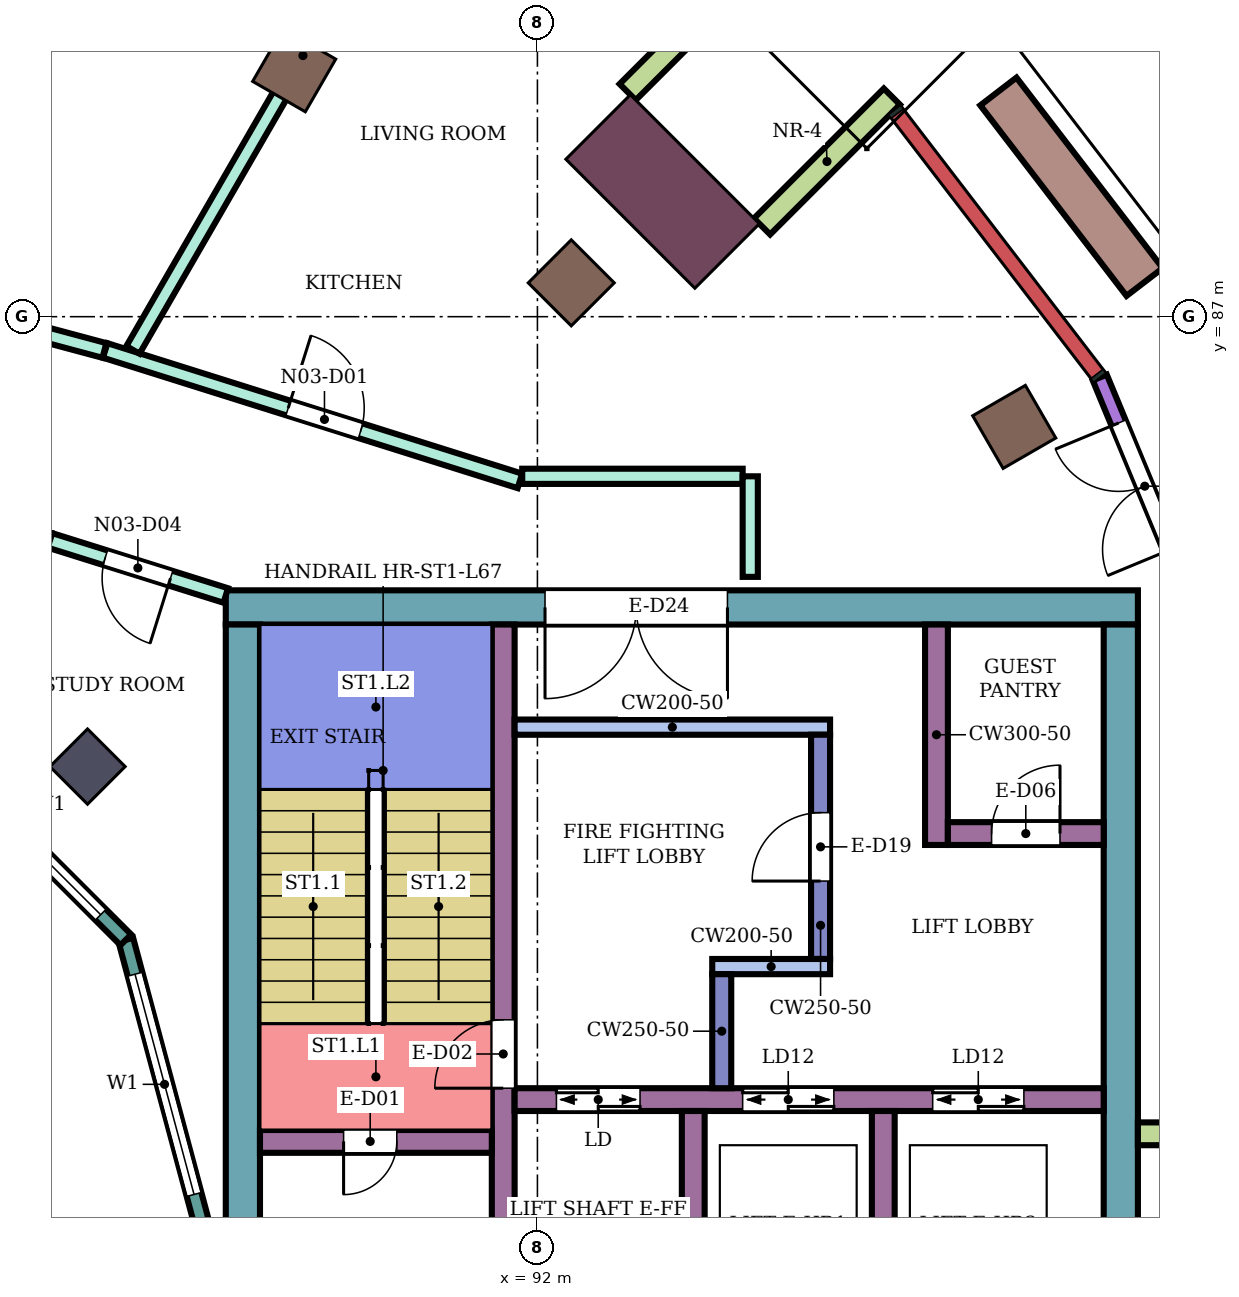
"""IFC4 building model, lengths in metres.
Left out: names, types, materials, properties, quantities, classifications, styles, units other than length and angle.
Written with IfcOpenShell. Run it as: python <this file> out.ifc"""

import sys

from ifc_helpers import new_model, si_unit, direction, frame, frame_2d, origin, origin_2d, place, context, subcontext, project, spatial, rectangle, extrude, element, fill, save


model = new_model("IFC4")
c1 = context("Model", 3, precision=1e-05, world=origin(), true_north=direction((0.0, 1.0)))
c2 = subcontext(c1, "Body", "Model", "MODEL_VIEW")
j1 = project(units=[si_unit("LENGTHUNIT", "METRE"), si_unit("PLANEANGLEUNIT", "RADIAN")], contexts=[c1])
p1 = place(None, origin())
s1 = spatial("IfcSite", under=j1, at=p1, CompositionType="ELEMENT")
p2 = place(p1, origin())
s2 = spatial("IfcBuilding", under=s1, at=p2, CompositionType="ELEMENT")
p3 = place(p2, frame((0.0, 0.0, 292.5)))
s3 = spatial("IfcBuildingStorey", under=s2, at=p3, CompositionType="ELEMENT", Elevation=292.5)
for number, where, z_axis, x_axis in (
    (1, (98.273, 85.55, 0.0), (0.0, 0.0, 1.0), (0.866, 0.5, 0.0)),
    (2, (92.445, 87.445, 0.0), (0.0, 0.0, 1.0), (0.707, 0.707, 0.0)),
    (3, (88.8, 90.242, 0.0), (0.0, 0.0, 1.0), (0.5, 0.866, 0.0)),
):
    element("IfcColumn", number, at=place(p3, frame(where, z_axis=z_axis, x_axis=x_axis)), inside=s3, PredefinedType="COLUMN", context=c2, shape_type="SweptSolid", body=[
        extrude(rectangle(XDim=0.8, YDim=0.8, at=origin_2d()), origin(), (0.0, 0.0, 1.0), 4.2),
    ])
p4 = place(p3, frame((86.081, 81.081, 0.0), z_axis=(0.0, 0.0, 1.0), x_axis=(0.707106781187, 0.707106781187, 0.0)))
e4 = element("IfcColumn", 4, at=p4, inside=s3, PredefinedType="COLUMN", context=c2, shape_type="SweptSolid", body=[
    extrude(rectangle(XDim=0.7, YDim=0.7, at=origin_2d()), origin(), (0.0, 0.0, 1.0), 4.2),
])
p5 = place(p3, frame((93.647, 88.647, 0.0), z_axis=(0.0, 0.0, 1.0), x_axis=(0.707106781187, 0.707106781187, 0.0)))
e5 = element("IfcColumn", 5, at=p5, inside=s3, PredefinedType="COLUMN", context=c2, shape_type="SweptSolid", body=[
    extrude(rectangle(XDim=1.2, YDim=2.4, at=origin_2d()), origin(), (0.0, 0.0, 1.0), 4.2),
])
p6 = place(p3, frame((87.9, 83.175, 0.0), z_axis=(0.0, 0.0, 1.0), x_axis=(1.0, 0.0, 0.0)))
e6 = element("IfcWall", 6, at=p6, inside=s3, PredefinedType="SHEAR", context=c2, shape_type="SweptSolid", body=[
    extrude(rectangle(XDim=12.0, YDim=0.45, at=frame_2d((6.0, 0.0))), origin(), (0.0, 0.0, 1.0), 3.88),
])
p7 = place(p6, frame((4.2, 0.0, 0.0)))
e7 = element("IfcOpeningElement", 7, at=p7, cuts=e6, PredefinedType="OPENING", context=c2, shape_type="SweptSolid", body=[
    extrude(rectangle(XDim=2.4, YDim=2.4, at=frame_2d((1.2, 1.2))), frame((0.0, 0.235, 0.0), z_axis=(0.0, -1.0, 0.0), x_axis=(1.0, 0.0, 0.0)), (0.0, 0.0, 1.0), 0.47),
])
p8 = place(p3, frame((88.125, 75.0, 0.0), z_axis=(0.0, 0.0, 1.0), x_axis=(0.0, 1.0, 0.0)))
e8 = element("IfcWall", 8, at=p8, inside=s3, PredefinedType="SHEAR", context=c2, shape_type="SweptSolid", body=[
    extrude(rectangle(XDim=7.95, YDim=0.45, at=frame_2d((3.975, 0.0))), origin(), (0.0, 0.0, 1.0), 3.88),
])
p9 = place(p3, frame((99.675, 73.6, 0.0), z_axis=(0.0, 0.0, 1.0), x_axis=(0.0, 1.0, 0.0)))
e9 = element("IfcWall", 9, at=p9, inside=s3, PredefinedType="SHEAR", context=c2, shape_type="SweptSolid", body=[
    extrude(rectangle(XDim=9.35, YDim=0.45, at=frame_2d((4.675, 0.0))), origin(), (0.0, 0.0, 1.0), 3.88),
])
p10 = place(p3, frame((91.55, 75.0, 0.0), z_axis=(0.0, 0.0, 1.0), x_axis=(0.0, 1.0, 0.0)))
e10 = element("IfcWall", 10, at=p10, inside=s3, PredefinedType="SHEAR", context=c2, shape_type="SweptSolid", body=[
    extrude(rectangle(XDim=7.95, YDim=0.3, at=frame_2d((3.975, 0.0))), origin(), (0.0, 0.0, 1.0), 3.88),
])
p11 = place(p10, frame((1.85, 0.0, 0.0)))
e11 = element("IfcOpeningElement", 11, at=p11, cuts=e10, PredefinedType="OPENING", context=c2, shape_type="SweptSolid", body=[
    extrude(rectangle(XDim=0.9, YDim=2.1, at=frame_2d((0.45, 1.05))), frame((0.0, 0.16, 0.0), z_axis=(0.0, -1.0, 0.0), x_axis=(1.0, 0.0, 0.0)), (0.0, 0.0, 1.0), 0.32),
])
p12 = place(p3, frame((88.35, 76.15, 0.0), z_axis=(0.0, 0.0, 1.0), x_axis=(1.0, 0.0, 0.0)))
e12 = element("IfcWall", 12, at=p12, inside=s3, PredefinedType="SHEAR", context=c2, shape_type="SweptSolid", body=[
    extrude(rectangle(XDim=3.05, YDim=0.3, at=frame_2d((1.525, 0.0))), origin(), (0.0, 0.0, 1.0), 3.88),
])
p13 = place(p12, frame((1.1, 0.0, 0.0)))
e13 = element("IfcOpeningElement", 13, at=p13, cuts=e12, PredefinedType="OPENING", context=c2, shape_type="SweptSolid", body=[
    extrude(rectangle(XDim=0.7, YDim=2.0, at=frame_2d((0.35, 1.0))), frame((0.0, 0.16, 0.0), z_axis=(0.0, -1.0, 0.0), x_axis=(1.0, 0.0, 0.0)), (0.0, 0.0, 1.0), 0.32),
])
p14 = place(p3, frame((91.7, 76.7, 0.0), z_axis=(0.0, 0.0, 1.0), x_axis=(1.0, 0.0, 0.0)))
e14 = element("IfcWall", 14, at=p14, inside=s3, PredefinedType="SHEAR", context=c2, shape_type="SweptSolid", body=[
    extrude(rectangle(XDim=7.75, YDim=0.3, at=frame_2d((3.875, 0.0))), origin(), (0.0, 0.0, 1.0), 3.88),
])
p15 = place(p14, frame((0.55, 0.0, 0.0)))
e15 = element("IfcOpeningElement", 15, at=p15, cuts=e14, PredefinedType="OPENING", context=c2, shape_type="SweptSolid", body=[
    extrude(rectangle(XDim=1.1, YDim=2.1, at=frame_2d((0.55, 1.05))), frame((0.0, 0.16, 0.0), z_axis=(0.0, -1.0, 0.0), x_axis=(1.0, 0.0, 0.0)), (0.0, 0.0, 1.0), 0.32),
])
p16 = place(p14, frame((3.0, 0.0, 0.0)))
e16 = element("IfcOpeningElement", 16, at=p16, cuts=e14, PredefinedType="OPENING", context=c2, shape_type="SweptSolid", body=[
    extrude(rectangle(XDim=1.2, YDim=2.1, at=frame_2d((0.6, 1.05))), frame((0.0, 0.16, 0.0), z_axis=(0.0, -1.0, 0.0), x_axis=(1.0, 0.0, 0.0)), (0.0, 0.0, 1.0), 0.32),
])
p17 = place(p14, frame((5.5, 0.0, 0.0)))
e17 = element("IfcOpeningElement", 17, at=p17, cuts=e14, PredefinedType="OPENING", context=c2, shape_type="SweptSolid", body=[
    extrude(rectangle(XDim=1.2, YDim=2.1, at=frame_2d((0.6, 1.05))), frame((0.0, 0.16, 0.0), z_axis=(0.0, -1.0, 0.0), x_axis=(1.0, 0.0, 0.0)), (0.0, 0.0, 1.0), 0.32),
])
for number, where, z_axis, x_axis in (
    (18, (94.05, 74.0, 0.0), (0.0, 0.0, 1.0), (0.0, 1.0, 0.0)),
    (19, (96.55, 74.0, 0.0), (0.0, 0.0, 1.0), (0.0, 1.0, 0.0)),
):
    element("IfcWall", number, at=place(p3, frame(where, z_axis=z_axis, x_axis=x_axis)), inside=s3, PredefinedType="SHEAR", context=c2, shape_type="SweptSolid", body=[
        extrude(rectangle(XDim=2.55, YDim=0.3, at=frame_2d((1.275, 0.0))), origin(), (0.0, 0.0, 1.0), 3.88),
    ])
p18 = place(p3, frame((91.7, 81.6, 0.0), z_axis=(0.0, 0.0, 1.0), x_axis=(1.0, 0.0, 0.0)))
e20 = element("IfcWall", 20, at=p18, inside=s3, PredefinedType="SHEAR", context=c2, shape_type="SweptSolid", body=[
    extrude(rectangle(XDim=4.15, YDim=0.2, at=frame_2d((2.075, 0.0))), origin(), (0.0, 0.0, 1.0), 3.88),
])
p19 = place(p3, frame((95.725, 78.55, 0.0), z_axis=(0.0, 0.0, 1.0), x_axis=(0.0, 1.0, 0.0)))
e21 = element("IfcWall", 21, at=p19, inside=s3, PredefinedType="SHEAR", context=c2, shape_type="SweptSolid", body=[
    extrude(rectangle(XDim=2.95, YDim=0.25, at=frame_2d((1.475, 0.0))), origin(), (0.0, 0.0, 1.0), 3.88),
])
p20 = place(p19, frame((1.025, 0.0, 0.0)))
e22 = element("IfcOpeningElement", 22, at=p20, cuts=e21, PredefinedType="OPENING", context=c2, shape_type="SweptSolid", body=[
    extrude(rectangle(XDim=0.9, YDim=2.1, at=frame_2d((0.45, 1.05))), frame((0.0, 0.135, 0.0), z_axis=(0.0, -1.0, 0.0), x_axis=(1.0, 0.0, 0.0)), (0.0, 0.0, 1.0), 0.27),
])
p21 = place(p3, frame((94.3, 78.45, 0.0), z_axis=(0.0, 0.0, 1.0), x_axis=(1.0, 0.0, 0.0)))
e23 = element("IfcWall", 23, at=p21, inside=s3, PredefinedType="SHEAR", context=c2, shape_type="SweptSolid", body=[
    extrude(rectangle(XDim=1.55, YDim=0.2, at=frame_2d((0.775, 0.0))), origin(), (0.0, 0.0, 1.0), 3.88),
])
p22 = place(p3, frame((94.425, 76.85, 0.0), z_axis=(0.0, 0.0, 1.0), x_axis=(0.0, 1.0, 0.0)))
e24 = element("IfcWall", 24, at=p22, inside=s3, PredefinedType="SHEAR", context=c2, shape_type="SweptSolid", body=[
    extrude(rectangle(XDim=1.5, YDim=0.25, at=frame_2d((0.75, 0.0))), origin(), (0.0, 0.0, 1.0), 3.88),
])
p23 = place(p3, frame((97.25, 80.05, 0.0), z_axis=(0.0, 0.0, 1.0), x_axis=(0.0, 1.0, 0.0)))
e25 = element("IfcWall", 25, at=p23, inside=s3, PredefinedType="SHEAR", context=c2, shape_type="SweptSolid", body=[
    extrude(rectangle(XDim=2.9, YDim=0.3, at=frame_2d((1.45, 0.0))), origin(), (0.0, 0.0, 1.0), 3.88),
])
p24 = place(p3, frame((97.4, 80.2, 0.0), z_axis=(0.0, 0.0, 1.0), x_axis=(1.0, 0.0, 0.0)))
e26 = element("IfcWall", 26, at=p24, inside=s3, PredefinedType="SHEAR", context=c2, shape_type="SweptSolid", body=[
    extrude(rectangle(XDim=2.05, YDim=0.3, at=frame_2d((1.025, 0.0))), origin(), (0.0, 0.0, 1.0), 3.88),
])
p25 = place(p24, frame((0.575, 0.0, 0.0)))
e27 = element("IfcOpeningElement", 27, at=p25, cuts=e26, PredefinedType="OPENING", context=c2, shape_type="SweptSolid", body=[
    extrude(rectangle(XDim=0.9, YDim=2.1, at=frame_2d((0.45, 1.05))), frame((0.0, 0.16, 0.0), z_axis=(0.0, -1.0, 0.0), x_axis=(1.0, 0.0, 0.0)), (0.0, 0.0, 1.0), 0.32),
])
p26 = place(p3, frame((101.636, 80.797, 0.0), z_axis=(0.0, 0.0, 1.0), x_axis=(-0.382708254591, 0.923869250418, 0.0)))
e28 = element("IfcWall", 28, at=p26, inside=s3, PredefinedType="NOTDEFINED", context=c2, shape_type="SweptSolid", body=[
    extrude(rectangle(XDim=5.847, YDim=0.2, at=frame_2d((2.924, 0.0))), origin(), (0.0, 0.0, 1.0), 4.2),
])
p27 = place(p26, frame((1.75, 0.0, 0.9)))
e29 = element("IfcOpeningElement", 29, at=p27, cuts=e28, PredefinedType="OPENING", context=c2, shape_type="SweptSolid", body=[
    extrude(rectangle(XDim=1.2, YDim=2.7, at=frame_2d((0.6, 1.35))), frame((0.0, 0.11, 0.0), z_axis=(0.0, -1.0, 0.0), x_axis=(1.0, 0.0, 0.0)), (0.0, 0.0, 1.0), 0.22),
])
p28 = place(p26, frame((3.4, 0.0, 0.0)))
e30 = element("IfcOpeningElement", 30, at=p28, cuts=e28, PredefinedType="OPENING", context=c2, shape_type="SweptSolid", body=[
    extrude(rectangle(XDim=1.8, YDim=2.7, at=frame_2d((0.9, 1.35))), frame((0.0, 0.11, 0.0), z_axis=(0.0, -1.0, 0.0), x_axis=(1.0, 0.0, 0.0)), (0.0, 0.0, 1.0), 0.22),
])
for number, where, z_axis, x_axis in (
    (31, (99.9, 76.25, 0.0), (0.0, 0.0, 1.0), (1.0, 0.0, 0.0)),
    (32, (94.955, 88.188, 0.0), (0.0, 0.0, 1.0), (0.707, 0.707, 0.0)),
    (33, (93.188, 89.955, 0.0), (0.0, 0.0, 1.0), (0.707, 0.707, 0.0)),
):
    element("IfcWall", number, at=place(p3, frame(where, z_axis=z_axis, x_axis=x_axis)), inside=s3, PredefinedType="NOTDEFINED", context=c2, shape_type="SweptSolid", body=[
        extrude(rectangle(XDim=2.416, YDim=0.3, at=frame_2d((1.208, 0.0))), origin(), (0.0, 0.0, 1.0), 4.2),
    ])
p29 = place(p3, frame((87.604, 75.0, 0.0), z_axis=(0.0, 0.0, 1.0), x_axis=(-0.258789828301, 0.965933654434, 0.0)))
e34 = element("IfcWall", 34, at=p29, inside=s3, PredefinedType="NOTDEFINED", context=c2, shape_type="SweptSolid", body=[
    extrude(rectangle(XDim=3.936, YDim=0.2, at=frame_2d((1.968, 0.0))), origin(), (0.0, 0.0, 1.0), 4.2),
])
p30 = place(p29, frame((0.468, 0.0, 0.9)))
e35 = element("IfcOpeningElement", 35, at=p30, cuts=e34, PredefinedType="OPENING", context=c2, shape_type="SweptSolid", body=[
    extrude(rectangle(XDim=3.0, YDim=2.3, at=frame_2d((1.5, 1.15))), frame((0.0, 0.11, 0.0), z_axis=(0.0, -1.0, 0.0), x_axis=(1.0, 0.0, 0.0)), (0.0, 0.0, 1.0), 0.22),
])
p31 = place(p3, frame((86.585, 78.802, 0.0), z_axis=(0.0, 0.0, 1.0), x_axis=(-0.707106781187, 0.707106781187, 0.0)))
e36 = element("IfcWall", 36, at=p31, inside=s3, PredefinedType="NOTDEFINED", context=c2, shape_type="SweptSolid", body=[
    extrude(rectangle(XDim=3.936, YDim=0.2, at=frame_2d((1.968, 0.0))), origin(), (0.0, 0.0, 1.0), 4.2),
])
p32 = place(p31, frame((0.468, 0.0, 0.9)))
e37 = element("IfcOpeningElement", 37, at=p32, cuts=e36, PredefinedType="OPENING", context=c2, shape_type="SweptSolid", body=[
    extrude(rectangle(XDim=3.0, YDim=2.3, at=frame_2d((1.5, 1.15))), frame((0.0, 0.11, 0.0), z_axis=(0.0, -1.0, 0.0), x_axis=(1.0, 0.0, 0.0)), (0.0, 0.0, 1.0), 0.22),
])
p33 = place(p3, frame((99.988, 87.456, 0.0), z_axis=(0.0, 0.0, 1.0), x_axis=(-0.608765634962, 0.793350112932, 0.0)))
e38 = element("IfcWall", 38, at=p33, inside=s3, PredefinedType="USERDEFINED", context=c2, shape_type="SweptSolid", body=[
    extrude(rectangle(XDim=3.16, YDim=0.6, at=frame_2d((1.58, 0.0))), origin(), (0.0, 0.0, 1.0), 0.6),
])
p34 = place(p3, frame((80.0, 88.246, 0.0), z_axis=(0.0, 0.0, 1.0), x_axis=(0.965856994925, -0.259075790752, 0.0)))
e39 = element("IfcWall", 39, at=p34, inside=s3, PredefinedType="PARTITIONING", context=c2, shape_type="SweptSolid", body=[
    extrude(rectangle(XDim=6.526, YDim=0.2, at=frame_2d((3.263, 0.0))), origin(), (0.0, 0.0, 1.0), 3.75),
])
p35 = place(p34, frame((2.768, 0.0, 0.0)))
e40 = element("IfcOpeningElement", 40, at=p35, cuts=e39, PredefinedType="OPENING", context=c2, shape_type="SweptSolid", body=[
    extrude(rectangle(XDim=1.0, YDim=2.1, at=frame_2d((0.5, 1.05))), frame((0.0, 0.11, 0.0), z_axis=(0.0, -1.0, 0.0), x_axis=(1.0, 0.0, 0.0)), (0.0, 0.0, 1.0), 0.22),
])
p36 = place(p3, frame((85.587, 84.057, 0.0), z_axis=(0.0, 0.0, 1.0), x_axis=(0.954239513179, -0.299043393987, 0.0)))
e41 = element("IfcWall", 41, at=p36, inside=s3, PredefinedType="PARTITIONING", context=c2, shape_type="SweptSolid", body=[
    extrude(rectangle(XDim=2.424, YDim=0.2, at=frame_2d((1.212, 0.0))), origin(), (0.0, 0.0, 1.0), 3.75),
])
p37 = place(p36, frame((0.762, 0.0, 0.0)))
e42 = element("IfcOpeningElement", 42, at=p37, cuts=e41, PredefinedType="OPENING", context=c2, shape_type="SweptSolid", body=[
    extrude(rectangle(XDim=0.9, YDim=2.1, at=frame_2d((0.45, 1.05))), frame((0.0, 0.11, 0.0), z_axis=(0.0, -1.0, 0.0), x_axis=(1.0, 0.0, 0.0)), (0.0, 0.0, 1.0), 0.22),
])
p38 = place(p3, frame((86.314, 86.556, 0.0), z_axis=(0.0, 0.0, 1.0), x_axis=(0.953912400139, -0.300085209334, 0.0)))
e43 = element("IfcWall", 43, at=p38, inside=s3, PredefinedType="PARTITIONING", context=c2, shape_type="SweptSolid", body=[
    extrude(rectangle(XDim=5.719, YDim=0.2, at=frame_2d((2.86, 0.0))), origin(), (0.0, 0.0, 1.0), 3.75),
])
p39 = place(p38, frame((2.524, 0.0, 0.0)))
e44 = element("IfcOpeningElement", 44, at=p39, cuts=e43, PredefinedType="OPENING", context=c2, shape_type="SweptSolid", body=[
    extrude(rectangle(XDim=1.0, YDim=2.1, at=frame_2d((0.5, 1.05))), frame((0.0, 0.11, 0.0), z_axis=(0.0, -1.0, 0.0), x_axis=(1.0, 0.0, 0.0)), (0.0, 0.0, 1.0), 0.22),
])
p40 = place(p3, frame((86.679, 86.563, 0.0), z_axis=(0.0, 0.0, 1.0), x_axis=(0.500152516677, 0.865937330331, 0.0)))
e45 = element("IfcWall", 45, at=p40, inside=s3, PredefinedType="PARTITIONING", context=c2, shape_type="SweptSolid", body=[
    extrude(rectangle(XDim=8.943, YDim=0.2, at=frame_2d((4.472, 0.0))), origin(), (0.0, 0.0, 1.0), 3.75),
])
p41 = place(p3, frame((91.8, 84.9, 0.0), z_axis=(0.0, 0.0, 1.0), x_axis=(1.0, 0.0, 0.0)))
e46 = element("IfcWall", 46, at=p41, inside=s3, PredefinedType="PARTITIONING", context=c2, shape_type="SweptSolid", body=[
    extrude(rectangle(XDim=2.9, YDim=0.2, at=frame_2d((1.45, 0.0))), origin(), (0.0, 0.0, 1.0), 3.75),
])
p42 = place(p3, frame((94.8, 83.577, 0.0), z_axis=(0.0, 0.0, 1.0), x_axis=(0.0, 1.0, 0.0)))
e47 = element("IfcWall", 47, at=p42, inside=s3, PredefinedType="PARTITIONING", context=c2, shape_type="SweptSolid", body=[
    extrude(rectangle(XDim=1.323, YDim=0.2, at=frame_2d((0.662, 0.0))), origin(), (0.0, 0.0, 1.0), 3.75),
])
p43 = place(p28, origin())
e48 = element("IfcDoor", 48, at=p43, inside=s3, OperationType="DOUBLE_DOOR_SINGLE_SWING", PredefinedType="DOOR", context=c2, shape_type="SweptSolid", body=[
    extrude(rectangle(XDim=1.8, YDim=2.7, at=frame_2d((0.9, 1.35))), frame((0.0, 0.025, 0.0), z_axis=(0.0, -1.0, 0.0), x_axis=(1.0, 0.0, 0.0)), (0.0, 0.0, 1.0), 0.05),
])
fill(e30, e48)
p44 = place(p30, origin())
e49 = element("IfcWindow", 49, at=p44, inside=s3, PartitioningType="SINGLE_PANEL", PredefinedType="WINDOW", context=c2, shape_type="SweptSolid", body=[
    extrude(rectangle(XDim=3.0, YDim=2.3, at=frame_2d((1.5, 1.15))), frame((0.0, 0.03, 0.0), z_axis=(0.0, -1.0, 0.0), x_axis=(1.0, 0.0, 0.0)), (0.0, 0.0, 1.0), 0.06),
])
fill(e35, e49)
p45 = place(p32, origin())
e50 = element("IfcWindow", 50, at=p45, inside=s3, PartitioningType="SINGLE_PANEL", PredefinedType="WINDOW", context=c2, shape_type="SweptSolid", body=[
    extrude(rectangle(XDim=3.0, YDim=2.3, at=frame_2d((1.5, 1.15))), frame((0.0, 0.03, 0.0), z_axis=(0.0, -1.0, 0.0), x_axis=(1.0, 0.0, 0.0)), (0.0, 0.0, 1.0), 0.06),
])
fill(e37, e50)
p46 = place(p39, origin())
e51 = element("IfcDoor", 51, at=p46, inside=s3, OperationType="SINGLE_SWING_LEFT", PredefinedType="DOOR", context=c2, shape_type="SweptSolid", body=[
    extrude(rectangle(XDim=1.0, YDim=2.1, at=frame_2d((0.5, 1.05))), frame((0.0, 0.025, 0.0), z_axis=(0.0, -1.0, 0.0), x_axis=(1.0, 0.0, 0.0)), (0.0, 0.0, 1.0), 0.05),
])
fill(e44, e51)
p47 = place(p37, frame((0.9, 0.0, 0.0), z_axis=(0.0, 0.0, 1.0), x_axis=(-1.0, 0.0, 0.0)))
e52 = element("IfcDoor", 52, at=p47, inside=s3, OperationType="SINGLE_SWING_LEFT", PredefinedType="DOOR", context=c2, shape_type="SweptSolid", body=[
    extrude(rectangle(XDim=0.9, YDim=2.1, at=frame_2d((0.45, 1.05))), frame((0.0, 0.025, 0.0), z_axis=(0.0, -1.0, 0.0), x_axis=(1.0, 0.0, 0.0)), (0.0, 0.0, 1.0), 0.05),
])
fill(e42, e52)
p48 = place(p13, frame((0.7, 0.0, 0.0), z_axis=(0.0, 0.0, 1.0), x_axis=(-1.0, 0.0, 0.0)))
e53 = element("IfcDoor", 53, at=p48, inside=s3, OperationType="SINGLE_SWING_RIGHT", PredefinedType="DOOR", context=c2, shape_type="SweptSolid", body=[
    extrude(rectangle(XDim=0.7, YDim=2.0, at=frame_2d((0.35, 1.0))), frame((0.0, 0.025, 0.0), z_axis=(0.0, -1.0, 0.0), x_axis=(1.0, 0.0, 0.0)), (0.0, 0.0, 1.0), 0.05),
])
fill(e13, e53)
p49 = place(p11, origin())
e54 = element("IfcDoor", 54, at=p49, inside=s3, OperationType="SINGLE_SWING_LEFT", PredefinedType="DOOR", context=c2, shape_type="SweptSolid", body=[
    extrude(rectangle(XDim=0.9, YDim=2.1, at=frame_2d((0.45, 1.05))), frame((0.0, 0.025, 0.0), z_axis=(0.0, -1.0, 0.0), x_axis=(1.0, 0.0, 0.0)), (0.0, 0.0, 1.0), 0.05),
])
fill(e11, e54)
p50 = place(p15, origin())
e55 = element("IfcDoor", 55, at=p50, inside=s3, OperationType="DOUBLE_DOOR_SLIDING", PredefinedType="DOOR", context=c2, shape_type="SweptSolid", body=[
    extrude(rectangle(XDim=1.1, YDim=2.1, at=frame_2d((0.55, 1.05))), frame((0.0, 0.025, 0.0), z_axis=(0.0, -1.0, 0.0), x_axis=(1.0, 0.0, 0.0)), (0.0, 0.0, 1.0), 0.05),
])
fill(e15, e55)
p51 = place(p16, origin())
e56 = element("IfcDoor", 56, at=p51, inside=s3, OperationType="DOUBLE_DOOR_SLIDING", PredefinedType="DOOR", context=c2, shape_type="SweptSolid", body=[
    extrude(rectangle(XDim=1.2, YDim=2.1, at=frame_2d((0.6, 1.05))), frame((0.0, 0.025, 0.0), z_axis=(0.0, -1.0, 0.0), x_axis=(1.0, 0.0, 0.0)), (0.0, 0.0, 1.0), 0.05),
])
fill(e16, e56)
p52 = place(p17, origin())
e57 = element("IfcDoor", 57, at=p52, inside=s3, OperationType="DOUBLE_DOOR_SLIDING", PredefinedType="DOOR", context=c2, shape_type="SweptSolid", body=[
    extrude(rectangle(XDim=1.2, YDim=2.1, at=frame_2d((0.6, 1.05))), frame((0.0, 0.025, 0.0), z_axis=(0.0, -1.0, 0.0), x_axis=(1.0, 0.0, 0.0)), (0.0, 0.0, 1.0), 0.05),
])
fill(e17, e57)
p53 = place(p20, origin())
e58 = element("IfcDoor", 58, at=p53, inside=s3, OperationType="SINGLE_SWING_LEFT", PredefinedType="DOOR", context=c2, shape_type="SweptSolid", body=[
    extrude(rectangle(XDim=0.9, YDim=2.1, at=frame_2d((0.45, 1.05))), frame((0.0, 0.025, 0.0), z_axis=(0.0, -1.0, 0.0), x_axis=(1.0, 0.0, 0.0)), (0.0, 0.0, 1.0), 0.05),
])
fill(e22, e58)
p54 = place(p25, origin())
e59 = element("IfcDoor", 59, at=p54, inside=s3, OperationType="SINGLE_SWING_RIGHT", PredefinedType="DOOR", context=c2, shape_type="SweptSolid", body=[
    extrude(rectangle(XDim=0.9, YDim=2.1, at=frame_2d((0.45, 1.05))), frame((0.0, 0.025, 0.0), z_axis=(0.0, -1.0, 0.0), x_axis=(1.0, 0.0, 0.0)), (0.0, 0.0, 1.0), 0.05),
])
fill(e27, e59)
p55 = place(p7, frame((2.4, 0.0, 0.0), z_axis=(0.0, 0.0, 1.0), x_axis=(-1.0, 0.0, 0.0)))
e60 = element("IfcDoor", 60, at=p55, inside=s3, OperationType="DOUBLE_DOOR_SINGLE_SWING", PredefinedType="DOOR", context=c2, shape_type="SweptSolid", body=[
    extrude(rectangle(XDim=2.4, YDim=2.4, at=frame_2d((1.2, 1.2))), frame((0.0, 0.025, 0.0), z_axis=(0.0, -1.0, 0.0), x_axis=(1.0, 0.0, 0.0)), (0.0, 0.0, 1.0), 0.05),
])
fill(e7, e60)
save(model, sys.argv[1])
